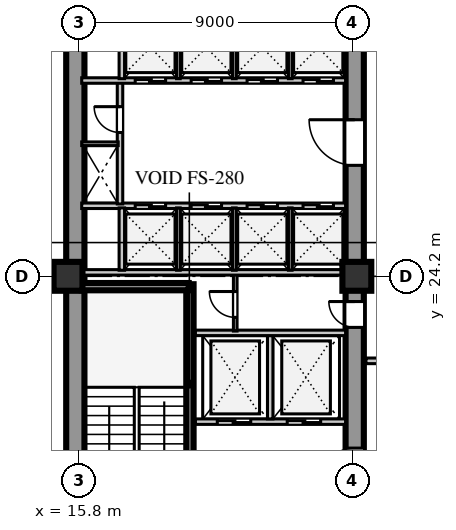
"""IFC4 building model, lengths in metres.
Left out: names, types, materials, properties, quantities, classifications, styles, units other than length and angle.
Written with IfcOpenShell. Run it as: python <this file> out.ifc"""

import sys

from ifc_helpers import new_model, si_unit, direction, frame, frame_2d, origin, origin_2d, place, context, subcontext, project, spatial, rectangle, extrude, element, fill, save


model = new_model("IFC4")
c1 = context("Model", 3, precision=1e-05, world=origin(), true_north=direction((0.0, 1.0)))
c2 = subcontext(c1, "Body", "Model", "MODEL_VIEW")
j1 = project(units=[si_unit("LENGTHUNIT", "METRE"), si_unit("PLANEANGLEUNIT", "RADIAN")], contexts=[c1])
p1 = place(None, origin())
s1 = spatial("IfcSite", under=j1, at=p1, CompositionType="ELEMENT")
p2 = place(p1, origin())
s2 = spatial("IfcBuilding", under=s1, at=p2, CompositionType="ELEMENT")
p3 = place(p2, frame((0.0, 0.0, 74.0)))
s3 = spatial("IfcBuildingStorey", under=s2, at=p3, CompositionType="ELEMENT", Elevation=74.0)
p4 = place(p3, frame((15.69, 15.81, 0.0), z_axis=(0.0, 0.0, 1.0), x_axis=(0.0, 1.0, 0.0)))
e1 = element("IfcWall", 1, at=p4, inside=s3, PredefinedType="SHEAR", context=c2, shape_type="SweptSolid", body=[
    extrude(rectangle(XDim=25.63, YDim=0.6, at=frame_2d((12.815, 0.0))), origin(), (0.0, 0.0, 1.0), 3.72),
])
p5 = place(p3, frame((24.88, 15.74, 0.0), z_axis=(0.0, 0.0, 1.0), x_axis=(0.0, 1.0, 0.0)))
e2 = element("IfcWall", 2, at=p5, inside=s3, PredefinedType="SHEAR", context=c2, shape_type="SweptSolid", body=[
    extrude(rectangle(XDim=25.76, YDim=0.6, at=frame_2d((12.88, 0.0))), origin(), (0.0, 0.0, 1.0), 3.72),
])
p6 = place(p5, frame((1.61, 0.0, 0.0)))
e3 = element("IfcOpeningElement", 3, at=p6, cuts=e2, PredefinedType="OPENING", context=c2, shape_type="SweptSolid", body=[
    extrude(rectangle(XDim=1.2, YDim=2.1, at=frame_2d((0.6, 1.05))), frame((0.0, 0.31, 0.0), z_axis=(0.0, -1.0, 0.0), x_axis=(1.0, 0.0, 0.0)), (0.0, 0.0, 1.0), 0.62),
])
p7 = place(p5, frame((6.78, 0.0, 0.0)))
e4 = element("IfcOpeningElement", 4, at=p7, cuts=e2, PredefinedType="OPENING", context=c2, shape_type="SweptSolid", body=[
    extrude(rectangle(XDim=0.85, YDim=2.06, at=frame_2d((0.425, 1.03))), frame((0.0, 0.31, 0.0), z_axis=(0.0, -1.0, 0.0), x_axis=(1.0, 0.0, 0.0)), (0.0, 0.0, 1.0), 0.62),
])
p8 = place(p5, frame((12.11, 0.0, 0.0)))
e5 = element("IfcOpeningElement", 5, at=p8, cuts=e2, PredefinedType="OPENING", context=c2, shape_type="SweptSolid", body=[
    extrude(rectangle(XDim=1.5, YDim=2.12, at=frame_2d((0.75, 1.06))), frame((0.0, 0.31, 0.0), z_axis=(0.0, -1.0, 0.0), x_axis=(1.0, 0.0, 0.0)), (0.0, 0.0, 1.0), 0.62),
])
p9 = place(p5, frame((20.11, 0.0, 0.0)))
e6 = element("IfcOpeningElement", 6, at=p9, cuts=e2, PredefinedType="OPENING", context=c2, shape_type="SweptSolid", body=[
    extrude(rectangle(XDim=1.2, YDim=2.12, at=frame_2d((0.6, 1.06))), frame((0.0, 0.31, 0.0), z_axis=(0.0, -1.0, 0.0), x_axis=(1.0, 0.0, 0.0)), (0.0, 0.0, 1.0), 0.62),
])
p10 = place(p5, frame((24.01, 0.0, 0.0)))
e7 = element("IfcOpeningElement", 7, at=p10, cuts=e2, PredefinedType="OPENING", context=c2, shape_type="SweptSolid", body=[
    extrude(rectangle(XDim=0.95, YDim=2.1, at=frame_2d((0.475, 1.05))), frame((0.0, 0.31, 0.0), z_axis=(0.0, -1.0, 0.0), x_axis=(1.0, 0.0, 0.0)), (0.0, 0.0, 1.0), 0.62),
])
for number, where, z_axis, x_axis in (
    (8, (15.45, 24.2, 0.0), (0.0, 0.0, 1.0), (1.0, 0.0, 0.0)),
    (9, (24.95, 24.2, 0.0), (0.0, 0.0, 1.0), (1.0, 0.0, 0.0)),
):
    element("IfcColumn", number, at=place(p3, frame(where, z_axis=z_axis, x_axis=x_axis)), inside=s3, PredefinedType="COLUMN", context=c2, shape_type="SweptSolid", body=[
        extrude(rectangle(XDim=0.95, YDim=0.95, at=origin_2d()), origin(), (0.0, 0.0, 1.0), 3.72),
    ])
p11 = place(p3, frame((19.46, 15.74, 0.0), z_axis=(0.0, 0.0, 1.0), x_axis=(0.0, 1.0, 0.0)))
e10 = element("IfcWall", 10, at=p11, inside=s3, PredefinedType="SHEAR", context=c2, shape_type="SweptSolid", body=[
    extrude(rectangle(XDim=8.2, YDim=0.24, at=frame_2d((4.1, 0.0))), origin(), (0.0, 0.0, 1.0), 4.0),
])
p12 = place(p11, frame((0.45, 0.0, 0.0)))
e11 = element("IfcOpeningElement", 11, at=p12, cuts=e10, PredefinedType="OPENING", context=c2, shape_type="SweptSolid", body=[
    extrude(rectangle(XDim=1.1, YDim=2.1, at=frame_2d((0.55, 1.05))), frame((0.0, 0.13, 0.0), z_axis=(0.0, -1.0, 0.0), x_axis=(1.0, 0.0, 0.0)), (0.0, 0.0, 1.0), 0.26),
])
p13 = place(p3, frame((15.9, 23.86, 0.0), z_axis=(0.0, 0.0, 1.0), x_axis=(1.0, 0.0, 0.0)))
e12 = element("IfcWall", 12, at=p13, inside=s3, PredefinedType="SHEAR", context=c2, shape_type="SweptSolid", body=[
    extrude(rectangle(XDim=3.52, YDim=0.24, at=frame_2d((1.76, 0.0))), origin(), (0.0, 0.0, 1.0), 4.0),
])
p14 = place(p3, frame((19.64, 19.42, 0.0), z_axis=(0.0, 0.0, 1.0), x_axis=(1.0, 0.0, 0.0)))
e13 = element("IfcWall", 13, at=p14, inside=s3, PredefinedType="SOLIDWALL", context=c2, shape_type="SweptSolid", body=[
    extrude(rectangle(XDim=4.94, YDim=0.18, at=frame_2d((2.47, 0.0))), origin(), (0.0, 0.0, 1.0), 3.72),
])
p15 = place(p14, frame((0.72, 0.0, 0.0)))
e14 = element("IfcOpeningElement", 14, at=p15, cuts=e13, PredefinedType="OPENING", context=c2, shape_type="SweptSolid", body=[
    extrude(rectangle(XDim=1.1, YDim=2.1, at=frame_2d((0.55, 1.05))), frame((0.0, 0.1, 0.0), z_axis=(0.0, -1.0, 0.0), x_axis=(1.0, 0.0, 0.0)), (0.0, 0.0, 1.0), 0.2),
])
p16 = place(p14, frame((3.02, 0.0, 0.0)))
e15 = element("IfcOpeningElement", 15, at=p16, cuts=e13, PredefinedType="OPENING", context=c2, shape_type="SweptSolid", body=[
    extrude(rectangle(XDim=1.1, YDim=2.1, at=frame_2d((0.55, 1.05))), frame((0.0, 0.1, 0.0), z_axis=(0.0, -1.0, 0.0), x_axis=(1.0, 0.0, 0.0)), (0.0, 0.0, 1.0), 0.2),
])
p17 = place(p3, frame((22.1, 19.51, 0.0), z_axis=(0.0, 0.0, 1.0), x_axis=(0.0, 1.0, 0.0)))
e16 = element("IfcWall", 16, at=p17, inside=s3, PredefinedType="SOLIDWALL", context=c2, shape_type="SweptSolid", body=[
    extrude(rectangle(XDim=2.74, YDim=0.18, at=frame_2d((1.37, 0.0))), origin(), (0.0, 0.0, 1.0), 3.72),
])
p18 = place(p3, frame((19.64, 22.34, 0.0), z_axis=(0.0, 0.0, 1.0), x_axis=(1.0, 0.0, 0.0)))
e17 = element("IfcWall", 17, at=p18, inside=s3, PredefinedType="SOLIDWALL", context=c2, shape_type="SweptSolid", body=[
    extrude(rectangle(XDim=4.94, YDim=0.18, at=frame_2d((2.47, 0.0))), origin(), (0.0, 0.0, 1.0), 3.72),
])
p19 = place(p3, frame((20.95, 22.4, 0.0), z_axis=(0.0, 0.0, 1.0), x_axis=(0.0, 1.0, 0.0)))
e18 = element("IfcWall", 18, at=p19, inside=s3, PredefinedType="PARTITIONING", context=c2, shape_type="SweptSolid", body=[
    extrude(rectangle(XDim=1.88, YDim=0.12, at=frame_2d((0.94, 0.0))), origin(), (0.0, 0.0, 1.0), 3.72),
])
p20 = place(p19, frame((0.45, 0.0, 0.0)))
e19 = element("IfcOpeningElement", 19, at=p20, cuts=e18, PredefinedType="OPENING", context=c2, shape_type="SweptSolid", body=[
    extrude(rectangle(XDim=0.85, YDim=2.06, at=frame_2d((0.425, 1.03))), frame((0.0, 0.07, 0.0), z_axis=(0.0, -1.0, 0.0), x_axis=(1.0, 0.0, 0.0)), (0.0, 0.0, 1.0), 0.14),
])
p21 = place(p3, frame((15.9, 26.52, 0.0), z_axis=(0.0, 0.0, 1.0), x_axis=(1.0, 0.0, 0.0)))
e20 = element("IfcWall", 20, at=p21, inside=s3, PredefinedType="SOLIDWALL", context=c2, shape_type="SweptSolid", body=[
    extrude(rectangle(XDim=8.68, YDim=0.18, at=frame_2d((4.34, 0.0))), origin(), (0.0, 0.0, 1.0), 3.72),
])
p22 = place(p21, frame((1.76, 0.0, 0.0)))
e21 = element("IfcOpeningElement", 21, at=p22, cuts=e20, PredefinedType="OPENING", context=c2, shape_type="SweptSolid", body=[
    extrude(rectangle(XDim=1.0, YDim=2.1, at=frame_2d((0.5, 1.05))), frame((0.0, 0.1, 0.0), z_axis=(0.0, -1.0, 0.0), x_axis=(1.0, 0.0, 0.0)), (0.0, 0.0, 1.0), 0.2),
])
p23 = place(p21, frame((3.6, 0.0, 0.0)))
e22 = element("IfcOpeningElement", 22, at=p23, cuts=e20, PredefinedType="OPENING", context=c2, shape_type="SweptSolid", body=[
    extrude(rectangle(XDim=1.0, YDim=2.1, at=frame_2d((0.5, 1.05))), frame((0.0, 0.1, 0.0), z_axis=(0.0, -1.0, 0.0), x_axis=(1.0, 0.0, 0.0)), (0.0, 0.0, 1.0), 0.2),
])
p24 = place(p21, frame((5.44, 0.0, 0.0)))
e23 = element("IfcOpeningElement", 23, at=p24, cuts=e20, PredefinedType="OPENING", context=c2, shape_type="SweptSolid", body=[
    extrude(rectangle(XDim=1.0, YDim=2.1, at=frame_2d((0.5, 1.05))), frame((0.0, 0.1, 0.0), z_axis=(0.0, -1.0, 0.0), x_axis=(1.0, 0.0, 0.0)), (0.0, 0.0, 1.0), 0.2),
])
p25 = place(p21, frame((7.28, 0.0, 0.0)))
e24 = element("IfcOpeningElement", 24, at=p25, cuts=e20, PredefinedType="OPENING", context=c2, shape_type="SweptSolid", body=[
    extrude(rectangle(XDim=1.0, YDim=2.1, at=frame_2d((0.5, 1.05))), frame((0.0, 0.1, 0.0), z_axis=(0.0, -1.0, 0.0), x_axis=(1.0, 0.0, 0.0)), (0.0, 0.0, 1.0), 0.2),
])
p26 = place(p3, frame((15.9, 24.33, 0.0), z_axis=(0.0, 0.0, 1.0), x_axis=(1.0, 0.0, 0.0)))
e25 = element("IfcWall", 25, at=p26, inside=s3, PredefinedType="SOLIDWALL", context=c2, shape_type="SweptSolid", body=[
    extrude(rectangle(XDim=8.68, YDim=0.18, at=frame_2d((4.34, 0.0))), origin(), (0.0, 0.0, 1.0), 3.02),
])
p27 = place(p3, frame((17.22, 24.4, 0.0), z_axis=(0.0, 0.0, 1.0), x_axis=(0.0, 1.0, 0.0)))
e26 = element("IfcWall", 26, at=p27, inside=s3, PredefinedType="SOLIDWALL", context=c2, shape_type="SweptSolid", body=[
    extrude(rectangle(XDim=2.05, YDim=0.18, at=frame_2d((1.025, 0.0))), origin(), (0.0, 0.0, 1.0), 3.72),
])
for number, where, z_axis, x_axis in (
    (27, (19.08, 24.4, 0.0), (0.0, 0.0, 1.0), (0.0, 1.0, 0.0)),
    (28, (20.92, 24.4, 0.0), (0.0, 0.0, 1.0), (0.0, 1.0, 0.0)),
    (29, (22.76, 24.4, 0.0), (0.0, 0.0, 1.0), (0.0, 1.0, 0.0)),
):
    element("IfcWall", number, at=place(p3, frame(where, z_axis=z_axis, x_axis=x_axis)), inside=s3, PredefinedType="PARTITIONING", context=c2, shape_type="SweptSolid", body=[
        extrude(rectangle(XDim=2.05, YDim=0.12, at=frame_2d((1.025, 0.0))), origin(), (0.0, 0.0, 1.0), 3.72),
    ])
p28 = place(p3, frame((17.16, 26.58, 0.0), z_axis=(0.0, 0.0, 1.0), x_axis=(0.0, 1.0, 0.0)))
e30 = element("IfcWall", 30, at=p28, inside=s3, PredefinedType="SOLIDWALL", context=c2, shape_type="SweptSolid", body=[
    extrude(rectangle(XDim=4.02, YDim=0.18, at=frame_2d((2.01, 0.0))), origin(), (0.0, 0.0, 1.0), 3.72),
])
p29 = place(p28, frame((2.35, 0.0, 0.0)))
e31 = element("IfcOpeningElement", 31, at=p29, cuts=e30, PredefinedType="OPENING", context=c2, shape_type="SweptSolid", body=[
    extrude(rectangle(XDim=0.85, YDim=2.06, at=frame_2d((0.425, 1.03))), frame((0.0, 0.1, 0.0), z_axis=(0.0, -1.0, 0.0), x_axis=(1.0, 0.0, 0.0)), (0.0, 0.0, 1.0), 0.2),
])
p30 = place(p3, frame((15.9, 28.56, 0.0), z_axis=(0.0, 0.0, 1.0), x_axis=(1.0, 0.0, 0.0)))
e32 = element("IfcWall", 32, at=p30, inside=s3, PredefinedType="PARTITIONING", context=c2, shape_type="SweptSolid", body=[
    extrude(rectangle(XDim=1.2, YDim=0.12, at=frame_2d((0.6, 0.0))), origin(), (0.0, 0.0, 1.0), 3.72),
])
p31 = place(p3, frame((15.9, 30.64, 0.0), z_axis=(0.0, 0.0, 1.0), x_axis=(1.0, 0.0, 0.0)))
e33 = element("IfcWall", 33, at=p31, inside=s3, PredefinedType="SOLIDWALL", context=c2, shape_type="SweptSolid", body=[
    extrude(rectangle(XDim=8.68, YDim=0.18, at=frame_2d((4.34, 0.0))), origin(), (0.0, 0.0, 1.0), 3.72),
])
p32 = place(p31, frame((1.76, 0.0, 0.0)))
e34 = element("IfcOpeningElement", 34, at=p32, cuts=e33, PredefinedType="OPENING", context=c2, shape_type="SweptSolid", body=[
    extrude(rectangle(XDim=1.0, YDim=2.1, at=frame_2d((0.5, 1.05))), frame((0.0, 0.1, 0.0), z_axis=(0.0, -1.0, 0.0), x_axis=(1.0, 0.0, 0.0)), (0.0, 0.0, 1.0), 0.2),
])
p33 = place(p31, frame((3.6, 0.0, 0.0)))
e35 = element("IfcOpeningElement", 35, at=p33, cuts=e33, PredefinedType="OPENING", context=c2, shape_type="SweptSolid", body=[
    extrude(rectangle(XDim=1.0, YDim=2.1, at=frame_2d((0.5, 1.05))), frame((0.0, 0.1, 0.0), z_axis=(0.0, -1.0, 0.0), x_axis=(1.0, 0.0, 0.0)), (0.0, 0.0, 1.0), 0.2),
])
p34 = place(p31, frame((5.44, 0.0, 0.0)))
e36 = element("IfcOpeningElement", 36, at=p34, cuts=e33, PredefinedType="OPENING", context=c2, shape_type="SweptSolid", body=[
    extrude(rectangle(XDim=1.0, YDim=2.1, at=frame_2d((0.5, 1.05))), frame((0.0, 0.1, 0.0), z_axis=(0.0, -1.0, 0.0), x_axis=(1.0, 0.0, 0.0)), (0.0, 0.0, 1.0), 0.2),
])
p35 = place(p31, frame((7.28, 0.0, 0.0)))
e37 = element("IfcOpeningElement", 37, at=p35, cuts=e33, PredefinedType="OPENING", context=c2, shape_type="SweptSolid", body=[
    extrude(rectangle(XDim=1.0, YDim=2.1, at=frame_2d((0.5, 1.05))), frame((0.0, 0.1, 0.0), z_axis=(0.0, -1.0, 0.0), x_axis=(1.0, 0.0, 0.0)), (0.0, 0.0, 1.0), 0.2),
])
p36 = place(p3, frame((17.22, 30.7, 0.0), z_axis=(0.0, 0.0, 1.0), x_axis=(0.0, 1.0, 0.0)))
e38 = element("IfcWall", 38, at=p36, inside=s3, PredefinedType="SOLIDWALL", context=c2, shape_type="SweptSolid", body=[
    extrude(rectangle(XDim=2.05, YDim=0.18, at=frame_2d((1.025, 0.0))), origin(), (0.0, 0.0, 1.0), 3.72),
])
for number, where, z_axis, x_axis in (
    (39, (19.08, 30.7, 0.0), (0.0, 0.0, 1.0), (0.0, 1.0, 0.0)),
    (40, (20.92, 30.7, 0.0), (0.0, 0.0, 1.0), (0.0, 1.0, 0.0)),
    (41, (22.76, 30.7, 0.0), (0.0, 0.0, 1.0), (0.0, 1.0, 0.0)),
):
    element("IfcWall", number, at=place(p3, frame(where, z_axis=z_axis, x_axis=x_axis)), inside=s3, PredefinedType="PARTITIONING", context=c2, shape_type="SweptSolid", body=[
        extrude(rectangle(XDim=2.05, YDim=0.12, at=frame_2d((1.025, 0.0))), origin(), (0.0, 0.0, 1.0), 3.72),
    ])
p37 = place(p3, frame((25.25, 21.42, 0.0), z_axis=(0.0, 0.0, 1.0), x_axis=(1.0, 0.0, 0.0)))
e42 = element("IfcWall", 42, at=p37, inside=s3, PredefinedType="SOLIDWALL", context=c2, shape_type="SweptSolid", body=[
    extrude(rectangle(XDim=12.87, YDim=0.185, at=frame_2d((6.435, 0.0))), origin(), (0.0, 0.0, 1.0), 3.32),
])
p38 = place(p37, frame((0.725, 0.0, 0.0)))
e43 = element("IfcOpeningElement", 43, at=p38, cuts=e42, PredefinedType="OPENING", context=c2, shape_type="SweptSolid", body=[
    extrude(rectangle(XDim=0.95, YDim=2.08, at=frame_2d((0.475, 1.04))), frame((0.0, 0.103, 0.0), z_axis=(0.0, -1.0, 0.0), x_axis=(1.0, 0.0, 0.0)), (0.0, 0.0, 1.0), 0.205),
])
p39 = place(p37, frame((3.025, 0.0, 0.0)))
e44 = element("IfcOpeningElement", 44, at=p39, cuts=e42, PredefinedType="OPENING", context=c2, shape_type="SweptSolid", body=[
    extrude(rectangle(XDim=0.95, YDim=2.08, at=frame_2d((0.475, 1.04))), frame((0.0, 0.103, 0.0), z_axis=(0.0, -1.0, 0.0), x_axis=(1.0, 0.0, 0.0)), (0.0, 0.0, 1.0), 0.205),
])
p40 = place(p37, frame((5.325, 0.0, 0.0)))
e45 = element("IfcOpeningElement", 45, at=p40, cuts=e42, PredefinedType="OPENING", context=c2, shape_type="SweptSolid", body=[
    extrude(rectangle(XDim=0.95, YDim=2.08, at=frame_2d((0.475, 1.04))), frame((0.0, 0.103, 0.0), z_axis=(0.0, -1.0, 0.0), x_axis=(1.0, 0.0, 0.0)), (0.0, 0.0, 1.0), 0.205),
])
p41 = place(p37, frame((7.625, 0.0, 0.0)))
e46 = element("IfcOpeningElement", 46, at=p41, cuts=e42, PredefinedType="OPENING", context=c2, shape_type="SweptSolid", body=[
    extrude(rectangle(XDim=0.95, YDim=2.08, at=frame_2d((0.475, 1.04))), frame((0.0, 0.103, 0.0), z_axis=(0.0, -1.0, 0.0), x_axis=(1.0, 0.0, 0.0)), (0.0, 0.0, 1.0), 0.205),
])
p42 = place(p37, frame((9.725, 0.0, 0.0)))
e47 = element("IfcOpeningElement", 47, at=p42, cuts=e42, PredefinedType="OPENING", context=c2, shape_type="SweptSolid", body=[
    extrude(rectangle(XDim=0.95, YDim=2.08, at=frame_2d((0.475, 1.04))), frame((0.0, 0.103, 0.0), z_axis=(0.0, -1.0, 0.0), x_axis=(1.0, 0.0, 0.0)), (0.0, 0.0, 1.0), 0.205),
])
p43 = place(p37, frame((11.495, 0.0, 0.0)))
e48 = element("IfcOpeningElement", 48, at=p43, cuts=e42, PredefinedType="OPENING", context=c2, shape_type="SweptSolid", body=[
    extrude(rectangle(XDim=0.95, YDim=2.08, at=frame_2d((0.475, 1.04))), frame((0.0, 0.103, 0.0), z_axis=(0.0, -1.0, 0.0), x_axis=(1.0, 0.0, 0.0)), (0.0, 0.0, 1.0), 0.205),
])
p44 = place(p15, origin())
e49 = element("IfcDoor", 49, at=p44, inside=s3, OperationType="DOUBLE_DOOR_SLIDING", PredefinedType="DOOR", context=c2, shape_type="SweptSolid", body=[
    extrude(rectangle(XDim=1.1, YDim=2.1, at=frame_2d((0.55, 1.05))), frame((0.0, 0.025, 0.0), z_axis=(0.0, -1.0, 0.0), x_axis=(1.0, 0.0, 0.0)), (0.0, 0.0, 1.0), 0.05),
])
fill(e14, e49)
p45 = place(p16, origin())
e50 = element("IfcDoor", 50, at=p45, inside=s3, OperationType="DOUBLE_DOOR_SLIDING", PredefinedType="DOOR", context=c2, shape_type="SweptSolid", body=[
    extrude(rectangle(XDim=1.1, YDim=2.1, at=frame_2d((0.55, 1.05))), frame((0.0, 0.025, 0.0), z_axis=(0.0, -1.0, 0.0), x_axis=(1.0, 0.0, 0.0)), (0.0, 0.0, 1.0), 0.05),
])
fill(e15, e50)
p46 = place(p6, frame((1.2, 0.0, 0.0), z_axis=(0.0, 0.0, 1.0), x_axis=(-1.0, 0.0, 0.0)))
e51 = element("IfcDoor", 51, at=p46, inside=s3, OperationType="SINGLE_SWING_RIGHT", PredefinedType="DOOR", context=c2, shape_type="SweptSolid", body=[
    extrude(rectangle(XDim=1.2, YDim=2.1, at=frame_2d((0.6, 1.05))), frame((0.0, 0.025, 0.0), z_axis=(0.0, -1.0, 0.0), x_axis=(1.0, 0.0, 0.0)), (0.0, 0.0, 1.0), 0.05),
])
fill(e3, e51)
p47 = place(p20, origin())
e52 = element("IfcDoor", 52, at=p47, inside=s3, OperationType="SINGLE_SWING_RIGHT", PredefinedType="DOOR", context=c2, shape_type="SweptSolid", body=[
    extrude(rectangle(XDim=0.85, YDim=2.06, at=frame_2d((0.425, 1.03))), frame((0.0, 0.025, 0.0), z_axis=(0.0, -1.0, 0.0), x_axis=(1.0, 0.0, 0.0)), (0.0, 0.0, 1.0), 0.05),
])
fill(e19, e52)
p48 = place(p7, frame((0.85, 0.0, 0.0), z_axis=(0.0, 0.0, 1.0), x_axis=(-1.0, 0.0, 0.0)))
e53 = element("IfcDoor", 53, at=p48, inside=s3, OperationType="SINGLE_SWING_LEFT", PredefinedType="DOOR", context=c2, shape_type="SweptSolid", body=[
    extrude(rectangle(XDim=0.85, YDim=2.06, at=frame_2d((0.425, 1.03))), frame((0.0, 0.025, 0.0), z_axis=(0.0, -1.0, 0.0), x_axis=(1.0, 0.0, 0.0)), (0.0, 0.0, 1.0), 0.05),
])
fill(e4, e53)
p49 = place(p22, origin())
e54 = element("IfcDoor", 54, at=p49, inside=s3, OperationType="DOUBLE_DOOR_SLIDING", PredefinedType="DOOR", context=c2, shape_type="SweptSolid", body=[
    extrude(rectangle(XDim=1.0, YDim=2.1, at=frame_2d((0.5, 1.05))), frame((0.0, 0.025, 0.0), z_axis=(0.0, -1.0, 0.0), x_axis=(1.0, 0.0, 0.0)), (0.0, 0.0, 1.0), 0.05),
])
fill(e21, e54)
p50 = place(p23, origin())
e55 = element("IfcDoor", 55, at=p50, inside=s3, OperationType="DOUBLE_DOOR_SLIDING", PredefinedType="DOOR", context=c2, shape_type="SweptSolid", body=[
    extrude(rectangle(XDim=1.0, YDim=2.1, at=frame_2d((0.5, 1.05))), frame((0.0, 0.025, 0.0), z_axis=(0.0, -1.0, 0.0), x_axis=(1.0, 0.0, 0.0)), (0.0, 0.0, 1.0), 0.05),
])
fill(e22, e55)
p51 = place(p24, origin())
e56 = element("IfcDoor", 56, at=p51, inside=s3, OperationType="DOUBLE_DOOR_SLIDING", PredefinedType="DOOR", context=c2, shape_type="SweptSolid", body=[
    extrude(rectangle(XDim=1.0, YDim=2.1, at=frame_2d((0.5, 1.05))), frame((0.0, 0.025, 0.0), z_axis=(0.0, -1.0, 0.0), x_axis=(1.0, 0.0, 0.0)), (0.0, 0.0, 1.0), 0.05),
])
fill(e23, e56)
p52 = place(p25, origin())
e57 = element("IfcDoor", 57, at=p52, inside=s3, OperationType="DOUBLE_DOOR_SLIDING", PredefinedType="DOOR", context=c2, shape_type="SweptSolid", body=[
    extrude(rectangle(XDim=1.0, YDim=2.1, at=frame_2d((0.5, 1.05))), frame((0.0, 0.025, 0.0), z_axis=(0.0, -1.0, 0.0), x_axis=(1.0, 0.0, 0.0)), (0.0, 0.0, 1.0), 0.05),
])
fill(e24, e57)
p53 = place(p29, origin())
e58 = element("IfcDoor", 58, at=p53, inside=s3, OperationType="SINGLE_SWING_RIGHT", PredefinedType="DOOR", context=c2, shape_type="SweptSolid", body=[
    extrude(rectangle(XDim=0.85, YDim=2.06, at=frame_2d((0.425, 1.03))), frame((0.0, 0.025, 0.0), z_axis=(0.0, -1.0, 0.0), x_axis=(1.0, 0.0, 0.0)), (0.0, 0.0, 1.0), 0.05),
])
fill(e31, e58)
p54 = place(p8, frame((1.5, 0.0, 0.0), z_axis=(0.0, 0.0, 1.0), x_axis=(-1.0, 0.0, 0.0)))
e59 = element("IfcDoor", 59, at=p54, inside=s3, OperationType="SINGLE_SWING_LEFT", PredefinedType="DOOR", context=c2, shape_type="SweptSolid", body=[
    extrude(rectangle(XDim=1.5, YDim=2.12, at=frame_2d((0.75, 1.06))), frame((0.0, 0.025, 0.0), z_axis=(0.0, -1.0, 0.0), x_axis=(1.0, 0.0, 0.0)), (0.0, 0.0, 1.0), 0.05),
])
fill(e5, e59)
p55 = place(p32, frame((1.0, 0.0, 0.0), z_axis=(0.0, 0.0, 1.0), x_axis=(-1.0, 0.0, 0.0)))
e60 = element("IfcDoor", 60, at=p55, inside=s3, OperationType="DOUBLE_DOOR_SLIDING", PredefinedType="DOOR", context=c2, shape_type="SweptSolid", body=[
    extrude(rectangle(XDim=1.0, YDim=2.1, at=frame_2d((0.5, 1.05))), frame((0.0, 0.025, 0.0), z_axis=(0.0, -1.0, 0.0), x_axis=(1.0, 0.0, 0.0)), (0.0, 0.0, 1.0), 0.05),
])
fill(e34, e60)
p56 = place(p33, frame((1.0, 0.0, 0.0), z_axis=(0.0, 0.0, 1.0), x_axis=(-1.0, 0.0, 0.0)))
e61 = element("IfcDoor", 61, at=p56, inside=s3, OperationType="DOUBLE_DOOR_SLIDING", PredefinedType="DOOR", context=c2, shape_type="SweptSolid", body=[
    extrude(rectangle(XDim=1.0, YDim=2.1, at=frame_2d((0.5, 1.05))), frame((0.0, 0.025, 0.0), z_axis=(0.0, -1.0, 0.0), x_axis=(1.0, 0.0, 0.0)), (0.0, 0.0, 1.0), 0.05),
])
fill(e35, e61)
p57 = place(p34, frame((1.0, 0.0, 0.0), z_axis=(0.0, 0.0, 1.0), x_axis=(-1.0, 0.0, 0.0)))
e62 = element("IfcDoor", 62, at=p57, inside=s3, OperationType="DOUBLE_DOOR_SLIDING", PredefinedType="DOOR", context=c2, shape_type="SweptSolid", body=[
    extrude(rectangle(XDim=1.0, YDim=2.1, at=frame_2d((0.5, 1.05))), frame((0.0, 0.025, 0.0), z_axis=(0.0, -1.0, 0.0), x_axis=(1.0, 0.0, 0.0)), (0.0, 0.0, 1.0), 0.05),
])
fill(e36, e62)
p58 = place(p35, frame((1.0, 0.0, 0.0), z_axis=(0.0, 0.0, 1.0), x_axis=(-1.0, 0.0, 0.0)))
e63 = element("IfcDoor", 63, at=p58, inside=s3, OperationType="DOUBLE_DOOR_SLIDING", PredefinedType="DOOR", context=c2, shape_type="SweptSolid", body=[
    extrude(rectangle(XDim=1.0, YDim=2.1, at=frame_2d((0.5, 1.05))), frame((0.0, 0.025, 0.0), z_axis=(0.0, -1.0, 0.0), x_axis=(1.0, 0.0, 0.0)), (0.0, 0.0, 1.0), 0.05),
])
fill(e37, e63)
save(model, sys.argv[1])
